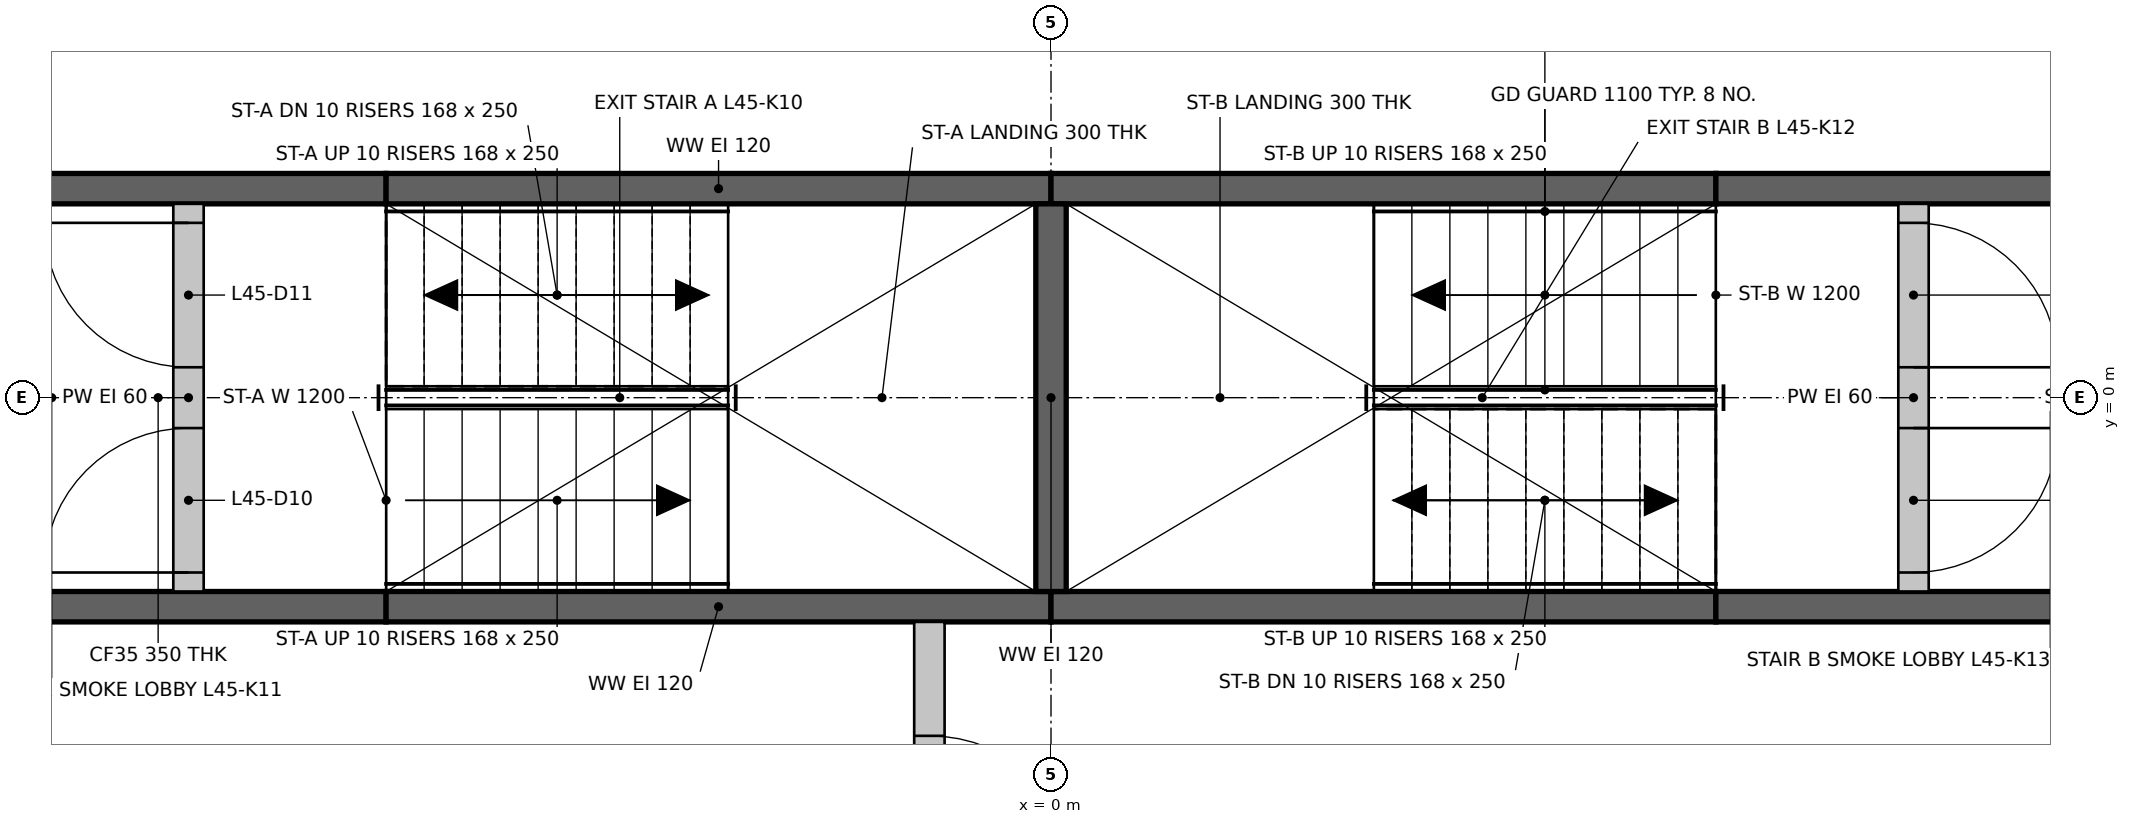
"""IFC4 building model, lengths in metres.
Left out: names, types, materials, properties, quantities, classifications, styles, units other than length and angle.
Written with IfcOpenShell. Run it as: python <this file> out.ifc"""

import sys

from ifc_helpers import new_model, si_unit, direction, frame, frame_2d, origin, place, context, subcontext, project, spatial, rectangle, extrude, element, fill, save


model = new_model("IFC4")
c1 = context("Model", 3, precision=1e-05, world=origin(), true_north=direction((0.0, 1.0)))
c2 = subcontext(c1, "Body", "Model", "MODEL_VIEW")
j1 = project(units=[si_unit("LENGTHUNIT", "METRE"), si_unit("PLANEANGLEUNIT", "RADIAN")], contexts=[c1])
p1 = place(None, origin())
s1 = spatial("IfcSite", under=j1, at=p1, CompositionType="ELEMENT")
p2 = place(p1, origin())
s2 = spatial("IfcBuilding", under=s1, at=p2, CompositionType="ELEMENT")
p3 = place(p2, frame((0.0, 0.0, 174.25)))
s3 = spatial("IfcBuildingStorey", under=s2, at=p3, CompositionType="ELEMENT", Elevation=174.25)
p4 = place(p3, frame((-7.374, -1.375, 0.0), z_axis=(0.0, 0.0, 1.0), x_axis=(1.0, 0.0, 0.0)))
e1 = element("IfcWall", 1, at=p4, inside=s3, PredefinedType="SHEAR", context=c2, shape_type="SweptSolid", body=[
    extrude(rectangle(XDim=3.0, YDim=0.2, at=frame_2d((1.5, 0.0))), origin(), (0.0, 0.0, 1.0), 3.0),
])
for number, where, z_axis, x_axis in (
    (2, (-4.374, -1.375, 0.0), (0.0, 0.0, 1.0), (1.0, 0.0, 0.0)),
    (3, (0.0, -1.375, 0.0), (0.0, 0.0, 1.0), (1.0, 0.0, 0.0)),
):
    element("IfcWall", number, at=place(p3, frame(where, z_axis=z_axis, x_axis=x_axis)), inside=s3, PredefinedType="SHEAR", context=c2, shape_type="SweptSolid", body=[
        extrude(rectangle(XDim=4.374, YDim=0.2, at=frame_2d((2.187, 0.0))), origin(), (0.0, 0.0, 1.0), 3.0),
    ])
for number, where, z_axis, x_axis in (
    (4, (4.374, -1.375, 0.0), (0.0, 0.0, 1.0), (1.0, 0.0, 0.0)),
    (5, (-7.374, 1.375, 0.0), (0.0, 0.0, 1.0), (1.0, 0.0, 0.0)),
):
    element("IfcWall", number, at=place(p3, frame(where, z_axis=z_axis, x_axis=x_axis)), inside=s3, PredefinedType="SHEAR", context=c2, shape_type="SweptSolid", body=[
        extrude(rectangle(XDim=3.0, YDim=0.2, at=frame_2d((1.5, 0.0))), origin(), (0.0, 0.0, 1.0), 3.0),
    ])
for number, where, z_axis, x_axis in (
    (6, (-4.374, 1.375, 0.0), (0.0, 0.0, 1.0), (1.0, 0.0, 0.0)),
    (7, (0.0, 1.375, 0.0), (0.0, 0.0, 1.0), (1.0, 0.0, 0.0)),
):
    element("IfcWall", number, at=place(p3, frame(where, z_axis=z_axis, x_axis=x_axis)), inside=s3, PredefinedType="SHEAR", context=c2, shape_type="SweptSolid", body=[
        extrude(rectangle(XDim=4.374, YDim=0.2, at=frame_2d((2.187, 0.0))), origin(), (0.0, 0.0, 1.0), 3.0),
    ])
p5 = place(p3, frame((4.374, 1.375, 0.0), z_axis=(0.0, 0.0, 1.0), x_axis=(1.0, 0.0, 0.0)))
e8 = element("IfcWall", 8, at=p5, inside=s3, PredefinedType="SHEAR", context=c2, shape_type="SweptSolid", body=[
    extrude(rectangle(XDim=3.0, YDim=0.2, at=frame_2d((1.5, 0.0))), origin(), (0.0, 0.0, 1.0), 3.0),
])
p6 = place(p3, frame((0.0, -1.275, 0.0), z_axis=(0.0, 0.0, 1.0), x_axis=(0.0, 1.0, 0.0)))
e9 = element("IfcWall", 9, at=p6, inside=s3, PredefinedType="SHEAR", context=c2, shape_type="SweptSolid", body=[
    extrude(rectangle(XDim=2.55, YDim=0.2, at=frame_2d((1.275, 0.0))), origin(), (0.0, 0.0, 1.0), 3.0),
])
p7 = place(p3, frame((-0.8, -3.974, 0.0), z_axis=(0.0, 0.0, 1.0), x_axis=(0.0, 1.0, 0.0)))
e10 = element("IfcWall", 10, at=p7, inside=s3, PredefinedType="PARTITIONING", context=c2, shape_type="SweptSolid", body=[
    extrude(rectangle(XDim=2.499, YDim=0.2, at=frame_2d((1.25, 0.0))), origin(), (0.0, 0.0, 1.0), 3.0),
])
p8 = place(p7, frame((0.75, 0.0, 0.0)))
e11 = element("IfcOpeningElement", 11, at=p8, cuts=e10, PredefinedType="OPENING", context=c2, shape_type="SweptSolid", body=[
    extrude(rectangle(XDim=1.0, YDim=2.1, at=frame_2d((0.5, 1.05))), frame((0.0, 0.11, 0.0), z_axis=(0.0, -1.0, 0.0), x_axis=(1.0, 0.0, 0.0)), (0.0, 0.0, 1.0), 0.22),
])
p9 = place(p3, frame((-5.674, -1.275, 0.0), z_axis=(0.0, 0.0, 1.0), x_axis=(0.0, 1.0, 0.0)))
e12 = element("IfcWall", 12, at=p9, inside=s3, PredefinedType="PARTITIONING", context=c2, shape_type="SweptSolid", body=[
    extrude(rectangle(XDim=2.55, YDim=0.2, at=frame_2d((1.275, 0.0))), origin(), (0.0, 0.0, 1.0), 3.0),
])
p10 = place(p9, frame((0.125, 0.0, 0.0)))
e13 = element("IfcOpeningElement", 13, at=p10, cuts=e12, PredefinedType="OPENING", context=c2, shape_type="SweptSolid", body=[
    extrude(rectangle(XDim=0.95, YDim=2.1, at=frame_2d((0.475, 1.05))), frame((0.0, 0.11, 0.0), z_axis=(0.0, -1.0, 0.0), x_axis=(1.0, 0.0, 0.0)), (0.0, 0.0, 1.0), 0.22),
])
p11 = place(p9, frame((1.475, 0.0, 0.0)))
e14 = element("IfcOpeningElement", 14, at=p11, cuts=e12, PredefinedType="OPENING", context=c2, shape_type="SweptSolid", body=[
    extrude(rectangle(XDim=0.95, YDim=2.1, at=frame_2d((0.475, 1.05))), frame((0.0, 0.11, 0.0), z_axis=(0.0, -1.0, 0.0), x_axis=(1.0, 0.0, 0.0)), (0.0, 0.0, 1.0), 0.22),
])
p12 = place(p3, frame((5.674, -1.275, 0.0), z_axis=(0.0, 0.0, 1.0), x_axis=(0.0, 1.0, 0.0)))
e15 = element("IfcWall", 15, at=p12, inside=s3, PredefinedType="PARTITIONING", context=c2, shape_type="SweptSolid", body=[
    extrude(rectangle(XDim=2.55, YDim=0.2, at=frame_2d((1.275, 0.0))), origin(), (0.0, 0.0, 1.0), 3.0),
])
p13 = place(p12, frame((0.125, 0.0, 0.0)))
e16 = element("IfcOpeningElement", 16, at=p13, cuts=e15, PredefinedType="OPENING", context=c2, shape_type="SweptSolid", body=[
    extrude(rectangle(XDim=0.95, YDim=2.1, at=frame_2d((0.475, 1.05))), frame((0.0, 0.11, 0.0), z_axis=(0.0, -1.0, 0.0), x_axis=(1.0, 0.0, 0.0)), (0.0, 0.0, 1.0), 0.22),
])
p14 = place(p12, frame((1.475, 0.0, 0.0)))
e17 = element("IfcOpeningElement", 17, at=p14, cuts=e15, PredefinedType="OPENING", context=c2, shape_type="SweptSolid", body=[
    extrude(rectangle(XDim=0.95, YDim=2.1, at=frame_2d((0.475, 1.05))), frame((0.0, 0.11, 0.0), z_axis=(0.0, -1.0, 0.0), x_axis=(1.0, 0.0, 0.0)), (0.0, 0.0, 1.0), 0.22),
])
p15 = place(p10, origin())
e18 = element("IfcDoor", 18, at=p15, inside=s3, OperationType="SINGLE_SWING_LEFT", PredefinedType="DOOR", context=c2, shape_type="SweptSolid", body=[
    extrude(rectangle(XDim=0.95, YDim=2.1, at=frame_2d((0.475, 1.05))), frame((0.0, 0.025, 0.0), z_axis=(0.0, -1.0, 0.0), x_axis=(1.0, 0.0, 0.0)), (0.0, 0.0, 1.0), 0.05),
])
fill(e13, e18)
p16 = place(p11, origin())
e19 = element("IfcDoor", 19, at=p16, inside=s3, OperationType="SINGLE_SWING_RIGHT", PredefinedType="DOOR", context=c2, shape_type="SweptSolid", body=[
    extrude(rectangle(XDim=0.95, YDim=2.1, at=frame_2d((0.475, 1.05))), frame((0.0, 0.025, 0.0), z_axis=(0.0, -1.0, 0.0), x_axis=(1.0, 0.0, 0.0)), (0.0, 0.0, 1.0), 0.05),
])
fill(e14, e19)
p17 = place(p13, frame((0.95, 0.0, 0.0), z_axis=(0.0, 0.0, 1.0), x_axis=(-1.0, 0.0, 0.0)))
e20 = element("IfcDoor", 20, at=p17, inside=s3, OperationType="SINGLE_SWING_RIGHT", PredefinedType="DOOR", context=c2, shape_type="SweptSolid", body=[
    extrude(rectangle(XDim=0.95, YDim=2.1, at=frame_2d((0.475, 1.05))), frame((0.0, 0.025, 0.0), z_axis=(0.0, -1.0, 0.0), x_axis=(1.0, 0.0, 0.0)), (0.0, 0.0, 1.0), 0.05),
])
fill(e16, e20)
p18 = place(p14, frame((0.95, 0.0, 0.0), z_axis=(0.0, 0.0, 1.0), x_axis=(-1.0, 0.0, 0.0)))
e21 = element("IfcDoor", 21, at=p18, inside=s3, OperationType="SINGLE_SWING_LEFT", PredefinedType="DOOR", context=c2, shape_type="SweptSolid", body=[
    extrude(rectangle(XDim=0.95, YDim=2.1, at=frame_2d((0.475, 1.05))), frame((0.0, 0.025, 0.0), z_axis=(0.0, -1.0, 0.0), x_axis=(1.0, 0.0, 0.0)), (0.0, 0.0, 1.0), 0.05),
])
fill(e17, e21)
p19 = place(p8, frame((1.0, 0.0, 0.0), z_axis=(0.0, 0.0, 1.0), x_axis=(-1.0, 0.0, 0.0)))
e22 = element("IfcDoor", 22, at=p19, inside=s3, OperationType="SINGLE_SWING_LEFT", PredefinedType="DOOR", context=c2, shape_type="SweptSolid", body=[
    extrude(rectangle(XDim=1.0, YDim=2.1, at=frame_2d((0.5, 1.05))), frame((0.0, 0.025, 0.0), z_axis=(0.0, -1.0, 0.0), x_axis=(1.0, 0.0, 0.0)), (0.0, 0.0, 1.0), 0.05),
])
fill(e11, e22)
save(model, sys.argv[1])
